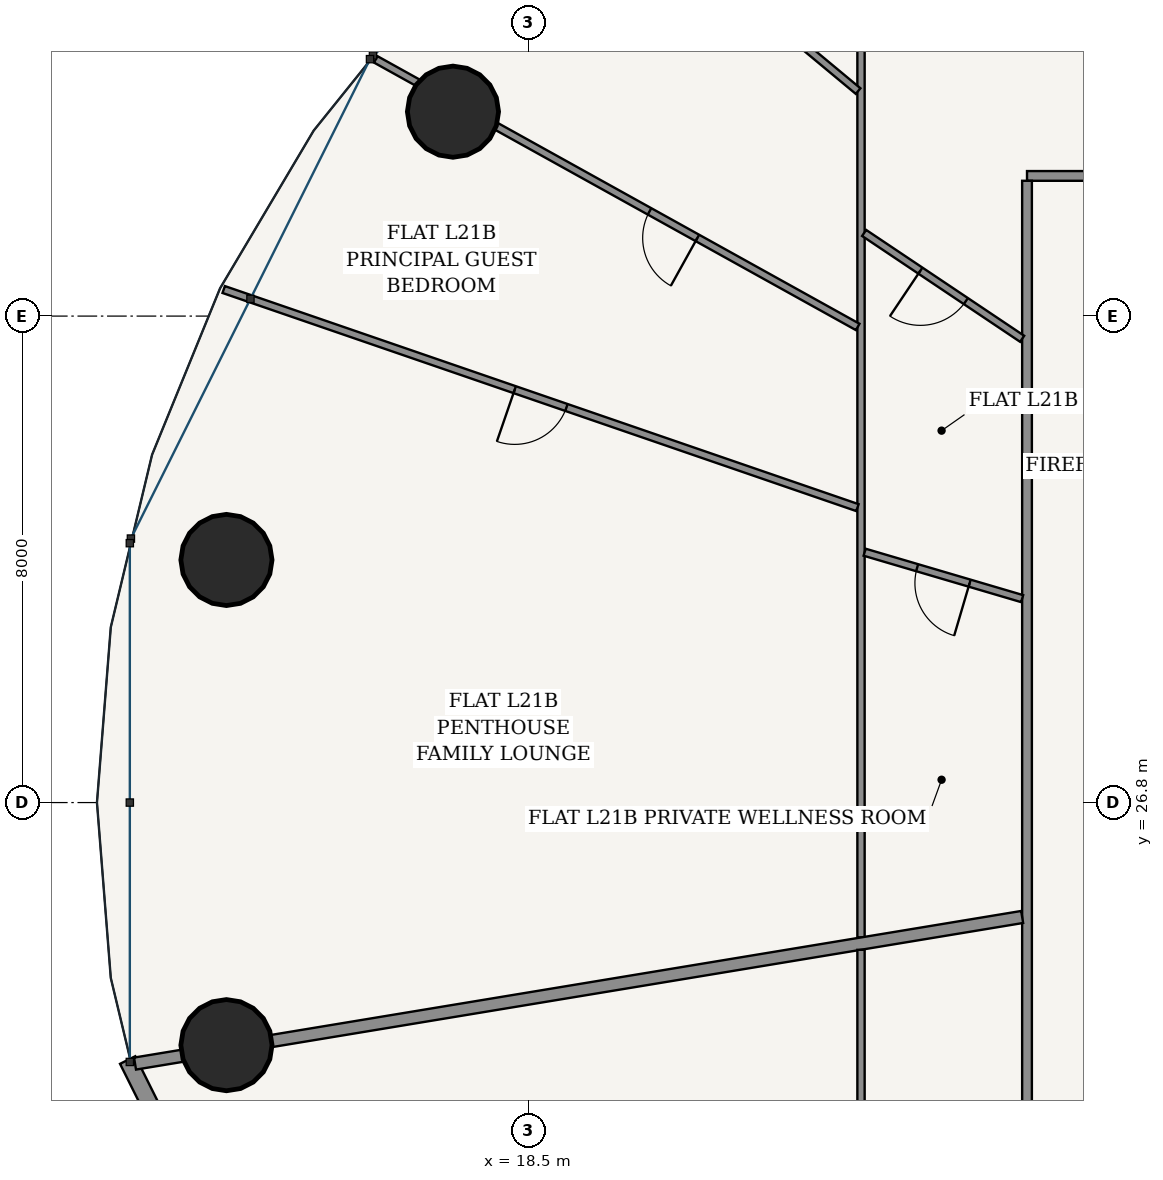
"""IFC4 building model, lengths in metres.
Left out: names, types, materials, properties, quantities, classifications, styles, units other than length and angle.
Written with IfcOpenShell. Run it as: python <this file> out.ifc"""

import sys

from ifc_helpers import new_model, si_unit, direction, frame, frame_2d, origin, origin_2d, place, context, subcontext, project, spatial, rectangle, hollow_circle, extrude, source, transform, mapped, element, fill, save


model = new_model("IFC4")
c1 = context("Model", 3, precision=1e-05, world=origin(), true_north=direction((-0.2419218956, 0.970295726276)))
c2 = subcontext(c1, "Body", "Model", "MODEL_VIEW")
j1 = project(units=[si_unit("LENGTHUNIT", "METRE"), si_unit("PLANEANGLEUNIT", "RADIAN")], contexts=[c1])
p1 = place(None, origin())
s1 = spatial("IfcSite", under=j1, at=p1, CompositionType="ELEMENT")
p2 = place(p1, origin())
s2 = spatial("IfcBuilding", under=s1, at=p2, CompositionType="ELEMENT")
p3 = place(p2, frame((0.0, 0.0, 83.4)))
s3 = spatial("IfcBuildingStorey", under=s2, at=p3, CompositionType="ELEMENT", Elevation=83.4)
for number, where, z_axis, x_axis in (
    (1, (17.255, 38.161, 0.0), (0.0, 0.0, 1.0), (1.0, 0.0, 0.0)),
    (2, (13.529, 30.79, 0.0), (0.0, 0.0, 1.0), (1.0, 0.0, 0.0)),
    (3, (13.529, 22.81, 0.0), (0.0, 0.0, 1.0), (1.0, 0.0, 0.0)),
):
    element("IfcColumn", number, at=place(p3, frame(where, z_axis=z_axis, x_axis=x_axis)), inside=s3, PredefinedType="COLUMN", context=c2, shape_type="SweptSolid", body=[
        extrude(hollow_circle(Radius=0.75, WallThickness=0.045, at=origin_2d()), origin(), (0.0, 0.0, 1.0), 3.6),
    ])
p4 = place(p3, frame((11.905, 22.566, 0.0), z_axis=(0.0, 0.0, 1.0), x_axis=(0.446274562077, -0.894896091869, 0.0)))
e4 = element("IfcWall", 4, at=p4, inside=s3, PredefinedType="SOLIDWALL", context=c2, shape_type="SweptSolid", body=[
    extrude(rectangle(XDim=9.05, YDim=0.28, at=frame_2d((4.525, 0.0))), origin(), (0.0, 0.0, 1.0), 3.325),
])
p5 = place(p4, frame((1.394, 0.0, 0.85)))
e5 = element("IfcOpeningElement", 5, at=p5, cuts=e4, PredefinedType="OPENING", context=c2, shape_type="SweptSolid", body=[
    extrude(rectangle(XDim=2.1, YDim=1.95, at=frame_2d((1.05, 0.975))), frame((0.0, 0.15, 0.0), z_axis=(0.0, -1.0, 0.0), x_axis=(1.0, 0.0, 0.0)), (0.0, 0.0, 1.0), 0.3),
])
p6 = place(p4, frame((5.557, 0.0, 0.85)))
e6 = element("IfcOpeningElement", 6, at=p6, cuts=e4, PredefinedType="OPENING", context=c2, shape_type="SweptSolid", body=[
    extrude(rectangle(XDim=2.1, YDim=1.95, at=frame_2d((1.05, 0.975))), frame((0.0, 0.15, 0.0), z_axis=(0.0, -1.0, 0.0), x_axis=(1.0, 0.0, 0.0)), (0.0, 0.0, 1.0), 0.3),
])
p7 = place(p3, frame((26.695, 37.105, 0.0), z_axis=(0.0, 0.0, 1.0), x_axis=(1.0, 0.0, 0.0)))
e7 = element("IfcWall", 7, at=p7, inside=s3, PredefinedType="PARTITIONING", context=c2, shape_type="SweptSolid", body=[
    extrude(rectangle(XDim=22.61, YDim=0.16, at=frame_2d((11.305, 0.0))), origin(), (0.0, 0.0, 1.0), 2.767),
])
p8 = place(p7, frame((18.812, 0.0, 0.0)))
e8 = element("IfcOpeningElement", 8, at=p8, cuts=e7, PredefinedType="OPENING", context=c2, shape_type="SweptSolid", body=[
    extrude(rectangle(XDim=0.98, YDim=2.2, at=frame_2d((0.49, 1.1))), frame((0.0, 0.09, 0.0), z_axis=(0.0, -1.0, 0.0), x_axis=(1.0, 0.0, 0.0)), (0.0, 0.0, 1.0), 0.18),
])
p9 = place(p7, frame((2.823, 0.0, 0.0)))
e9 = element("IfcOpeningElement", 9, at=p9, cuts=e7, PredefinedType="OPENING", context=c2, shape_type="SweptSolid", body=[
    extrude(rectangle(XDim=0.98, YDim=2.2, at=frame_2d((0.49, 1.1))), frame((0.0, 0.09, 0.0), z_axis=(0.0, -1.0, 0.0), x_axis=(1.0, 0.0, 0.0)), (0.0, 0.0, 1.0), 0.18),
])
p10 = place(p3, frame((26.695, 16.575, 0.0), z_axis=(0.0, 0.0, 1.0), x_axis=(0.0, 1.0, 0.0)))
e10 = element("IfcWall", 10, at=p10, inside=s3, PredefinedType="PARTITIONING", context=c2, shape_type="SweptSolid", body=[
    extrude(rectangle(XDim=20.45, YDim=0.16, at=frame_2d((10.225, 0.0))), origin(), (0.0, 0.0, 1.0), 2.767),
])
p11 = place(p10, frame((1.977, 0.0, 0.0)))
e11 = element("IfcOpeningElement", 11, at=p11, cuts=e10, PredefinedType="OPENING", context=c2, shape_type="SweptSolid", body=[
    extrude(rectangle(XDim=0.98, YDim=2.2, at=frame_2d((0.49, 1.1))), frame((0.0, 0.09, 0.0), z_axis=(0.0, -1.0, 0.0), x_axis=(1.0, 0.0, 0.0)), (0.0, 0.0, 1.0), 0.18),
])
p12 = place(p3, frame((23.965, 24.583, 0.0), z_axis=(0.0, 0.0, 1.0), x_axis=(0.0, 1.0, 0.0)))
e12 = element("IfcWall", 12, at=p12, inside=s3, PredefinedType="PARTITIONING", context=c2, shape_type="SweptSolid", body=[
    extrude(rectangle(XDim=15.252, YDim=0.12, at=frame_2d((7.626, 0.0))), origin(), (0.0, 0.0, 1.0), 2.767),
])
p13 = place(p3, frame((23.917, 38.5, 0.0), z_axis=(0.0, 0.0, 1.0), x_axis=(-0.769161827891, 0.63905405289, 0.0)))
e13 = element("IfcWall", 13, at=p13, inside=s3, PredefinedType="PARTITIONING", context=c2, shape_type="SweptSolid", body=[
    extrude(rectangle(XDim=6.08, YDim=0.12, at=frame_2d((3.04, 0.0))), origin(), (0.0, 0.0, 1.0), 2.767),
])
p14 = place(p13, frame((2.59, 0.0, 0.0)))
e14 = element("IfcOpeningElement", 14, at=p14, cuts=e13, PredefinedType="OPENING", context=c2, shape_type="SweptSolid", body=[
    extrude(rectangle(XDim=0.9, YDim=2.15, at=frame_2d((0.45, 1.075))), frame((0.0, 0.07, 0.0), z_axis=(0.0, -1.0, 0.0), x_axis=(1.0, 0.0, 0.0)), (0.0, 0.0, 1.0), 0.14),
])
p15 = place(p3, frame((23.911, 34.622, 0.0), z_axis=(0.0, 0.0, 1.0), x_axis=(-0.874324904351, 0.485341077626, 0.0)))
e15 = element("IfcWall", 15, at=p15, inside=s3, PredefinedType="PARTITIONING", context=c2, shape_type="SweptSolid", body=[
    extrude(rectangle(XDim=9.066, YDim=0.12, at=frame_2d((4.533, 0.0))), origin(), (0.0, 0.0, 1.0), 2.767),
])
p16 = place(p15, frame((3.016, 0.0, 0.0)))
e16 = element("IfcOpeningElement", 16, at=p16, cuts=e15, PredefinedType="OPENING", context=c2, shape_type="SweptSolid", body=[
    extrude(rectangle(XDim=0.9, YDim=2.15, at=frame_2d((0.45, 1.075))), frame((0.0, 0.07, 0.0), z_axis=(0.0, -1.0, 0.0), x_axis=(1.0, 0.0, 0.0)), (0.0, 0.0, 1.0), 0.14),
])
p17 = place(p3, frame((23.906, 31.65, 0.0), z_axis=(0.0, 0.0, 1.0), x_axis=(-0.945573120726, 0.32540970078, 0.0)))
e17 = element("IfcWall", 17, at=p17, inside=s3, PredefinedType="PARTITIONING", context=c2, shape_type="SweptSolid", body=[
    extrude(rectangle(XDim=11.022, YDim=0.12, at=frame_2d((5.511, 0.0))), origin(), (0.0, 0.0, 1.0), 2.767),
])
p18 = place(p17, frame((5.061, 0.0, 0.0)))
e18 = element("IfcOpeningElement", 18, at=p18, cuts=e17, PredefinedType="OPENING", context=c2, shape_type="SweptSolid", body=[
    extrude(rectangle(XDim=0.9, YDim=2.15, at=frame_2d((0.45, 1.075))), frame((0.0, 0.07, 0.0), z_axis=(0.0, -1.0, 0.0), x_axis=(1.0, 0.0, 0.0)), (0.0, 0.0, 1.0), 0.14),
])
p19 = place(p3, frame((26.615, 34.427, 0.0), z_axis=(0.0, 0.0, 1.0), x_axis=(-0.830799215213, 0.556572245088, 0.0)))
e19 = element("IfcWall", 19, at=p19, inside=s3, PredefinedType="PARTITIONING", context=c2, shape_type="SweptSolid", body=[
    extrude(rectangle(XDim=3.128, YDim=0.12, at=frame_2d((1.564, 0.0))), origin(), (0.0, 0.0, 1.0), 3.004),
])
p20 = place(p19, frame((1.114, 0.0, 0.0)))
e20 = element("IfcOpeningElement", 20, at=p20, cuts=e19, PredefinedType="OPENING", context=c2, shape_type="SweptSolid", body=[
    extrude(rectangle(XDim=0.9, YDim=2.15, at=frame_2d((0.45, 1.075))), frame((0.0, 0.07, 0.0), z_axis=(0.0, -1.0, 0.0), x_axis=(1.0, 0.0, 0.0)), (0.0, 0.0, 1.0), 0.14),
])
p21 = place(p3, frame((26.615, 30.154, 0.0), z_axis=(0.0, 0.0, 1.0), x_axis=(-0.959264672883, 0.282508915537, 0.0)))
e21 = element("IfcWall", 21, at=p21, inside=s3, PredefinedType="PARTITIONING", context=c2, shape_type="SweptSolid", body=[
    extrude(rectangle(XDim=2.701, YDim=0.12, at=frame_2d((1.35, 0.0))), origin(), (0.0, 0.0, 1.0), 3.325),
])
p22 = place(p21, frame((0.9, 0.0, 0.0)))
e22 = element("IfcOpeningElement", 22, at=p22, cuts=e21, PredefinedType="OPENING", context=c2, shape_type="SweptSolid", body=[
    extrude(rectangle(XDim=0.9, YDim=2.15, at=frame_2d((0.45, 1.075))), frame((0.0, 0.07, 0.0), z_axis=(0.0, -1.0, 0.0), x_axis=(1.0, 0.0, 0.0)), (0.0, 0.0, 1.0), 0.14),
])
p23 = place(p3, frame((26.615, 24.918, 0.0), z_axis=(0.0, 0.0, 1.0), x_axis=(-0.986618789677, -0.163044054958, 0.0)))
e23 = element("IfcWall", 23, at=p23, inside=s3, PredefinedType="PARTITIONING", context=c2, shape_type="SweptSolid", body=[
    extrude(rectangle(XDim=14.787, YDim=0.2, at=frame_2d((7.393, 0.0))), origin(), (0.0, 0.0, 1.0), 2.767),
])
p24 = place(p3, frame((23.965, 13.765, 0.0), z_axis=(0.0, 0.0, 1.0), x_axis=(0.0, 1.0, 0.0)))
e24 = element("IfcWall", 24, at=p24, inside=s3, PredefinedType="PARTITIONING", context=c2, shape_type="SweptSolid", body=[
    extrude(rectangle(XDim=10.614, YDim=0.12, at=frame_2d((5.307, 0.0))), origin(), (0.0, 0.0, 1.0), 2.767),
])
p25 = place(p24, frame((2.815, 0.0, 0.0)))
e25 = element("IfcOpeningElement", 25, at=p25, cuts=e24, PredefinedType="OPENING", context=c2, shape_type="SweptSolid", body=[
    extrude(rectangle(XDim=0.9, YDim=2.15, at=frame_2d((0.45, 1.075))), frame((0.0, 0.07, 0.0), z_axis=(0.0, -1.0, 0.0), x_axis=(1.0, 0.0, 0.0)), (0.0, 0.0, 1.0), 0.14),
])
m1 = source(origin(), c2, "Body", "SweptSolid", [
    extrude(rectangle(XDim=0.9, YDim=2.15, at=frame_2d((0.45, 1.075))), frame((0.0, 0.025, 0.0), z_axis=(0.0, -1.0, 0.0), x_axis=(1.0, 0.0, 0.0)), (0.0, 0.0, 1.0), 0.05),
])
p26 = place(p20, origin())
e26 = element("IfcDoor", 26, at=p26, inside=s3, OperationType="SINGLE_SWING_RIGHT", PredefinedType="DOOR", context=c2, shape_type="MappedRepresentation", body=[
    mapped(m1, transform((0.0, 0.0, 0.0), scale=1.0)),
])
fill(e20, e26)
p27 = place(p22, origin())
e27 = element("IfcDoor", 27, at=p27, inside=s3, OperationType="SINGLE_SWING_LEFT", PredefinedType="DOOR", context=c2, shape_type="MappedRepresentation", body=[
    mapped(m1, transform((0.0, 0.0, 0.0), scale=1.0)),
])
fill(e22, e27)
p28 = place(p16, origin())
e28 = element("IfcDoor", 28, at=p28, inside=s3, OperationType="SINGLE_SWING_LEFT", PredefinedType="DOOR", context=c2, shape_type="MappedRepresentation", body=[
    mapped(m1, transform((0.0, 0.0, 0.0), scale=1.0)),
])
fill(e16, e28)
p29 = place(p18, origin())
e29 = element("IfcDoor", 29, at=p29, inside=s3, OperationType="SINGLE_SWING_RIGHT", PredefinedType="DOOR", context=c2, shape_type="MappedRepresentation", body=[
    mapped(m1, transform((0.0, 0.0, 0.0), scale=1.0)),
])
fill(e18, e29)
save(model, sys.argv[1])
